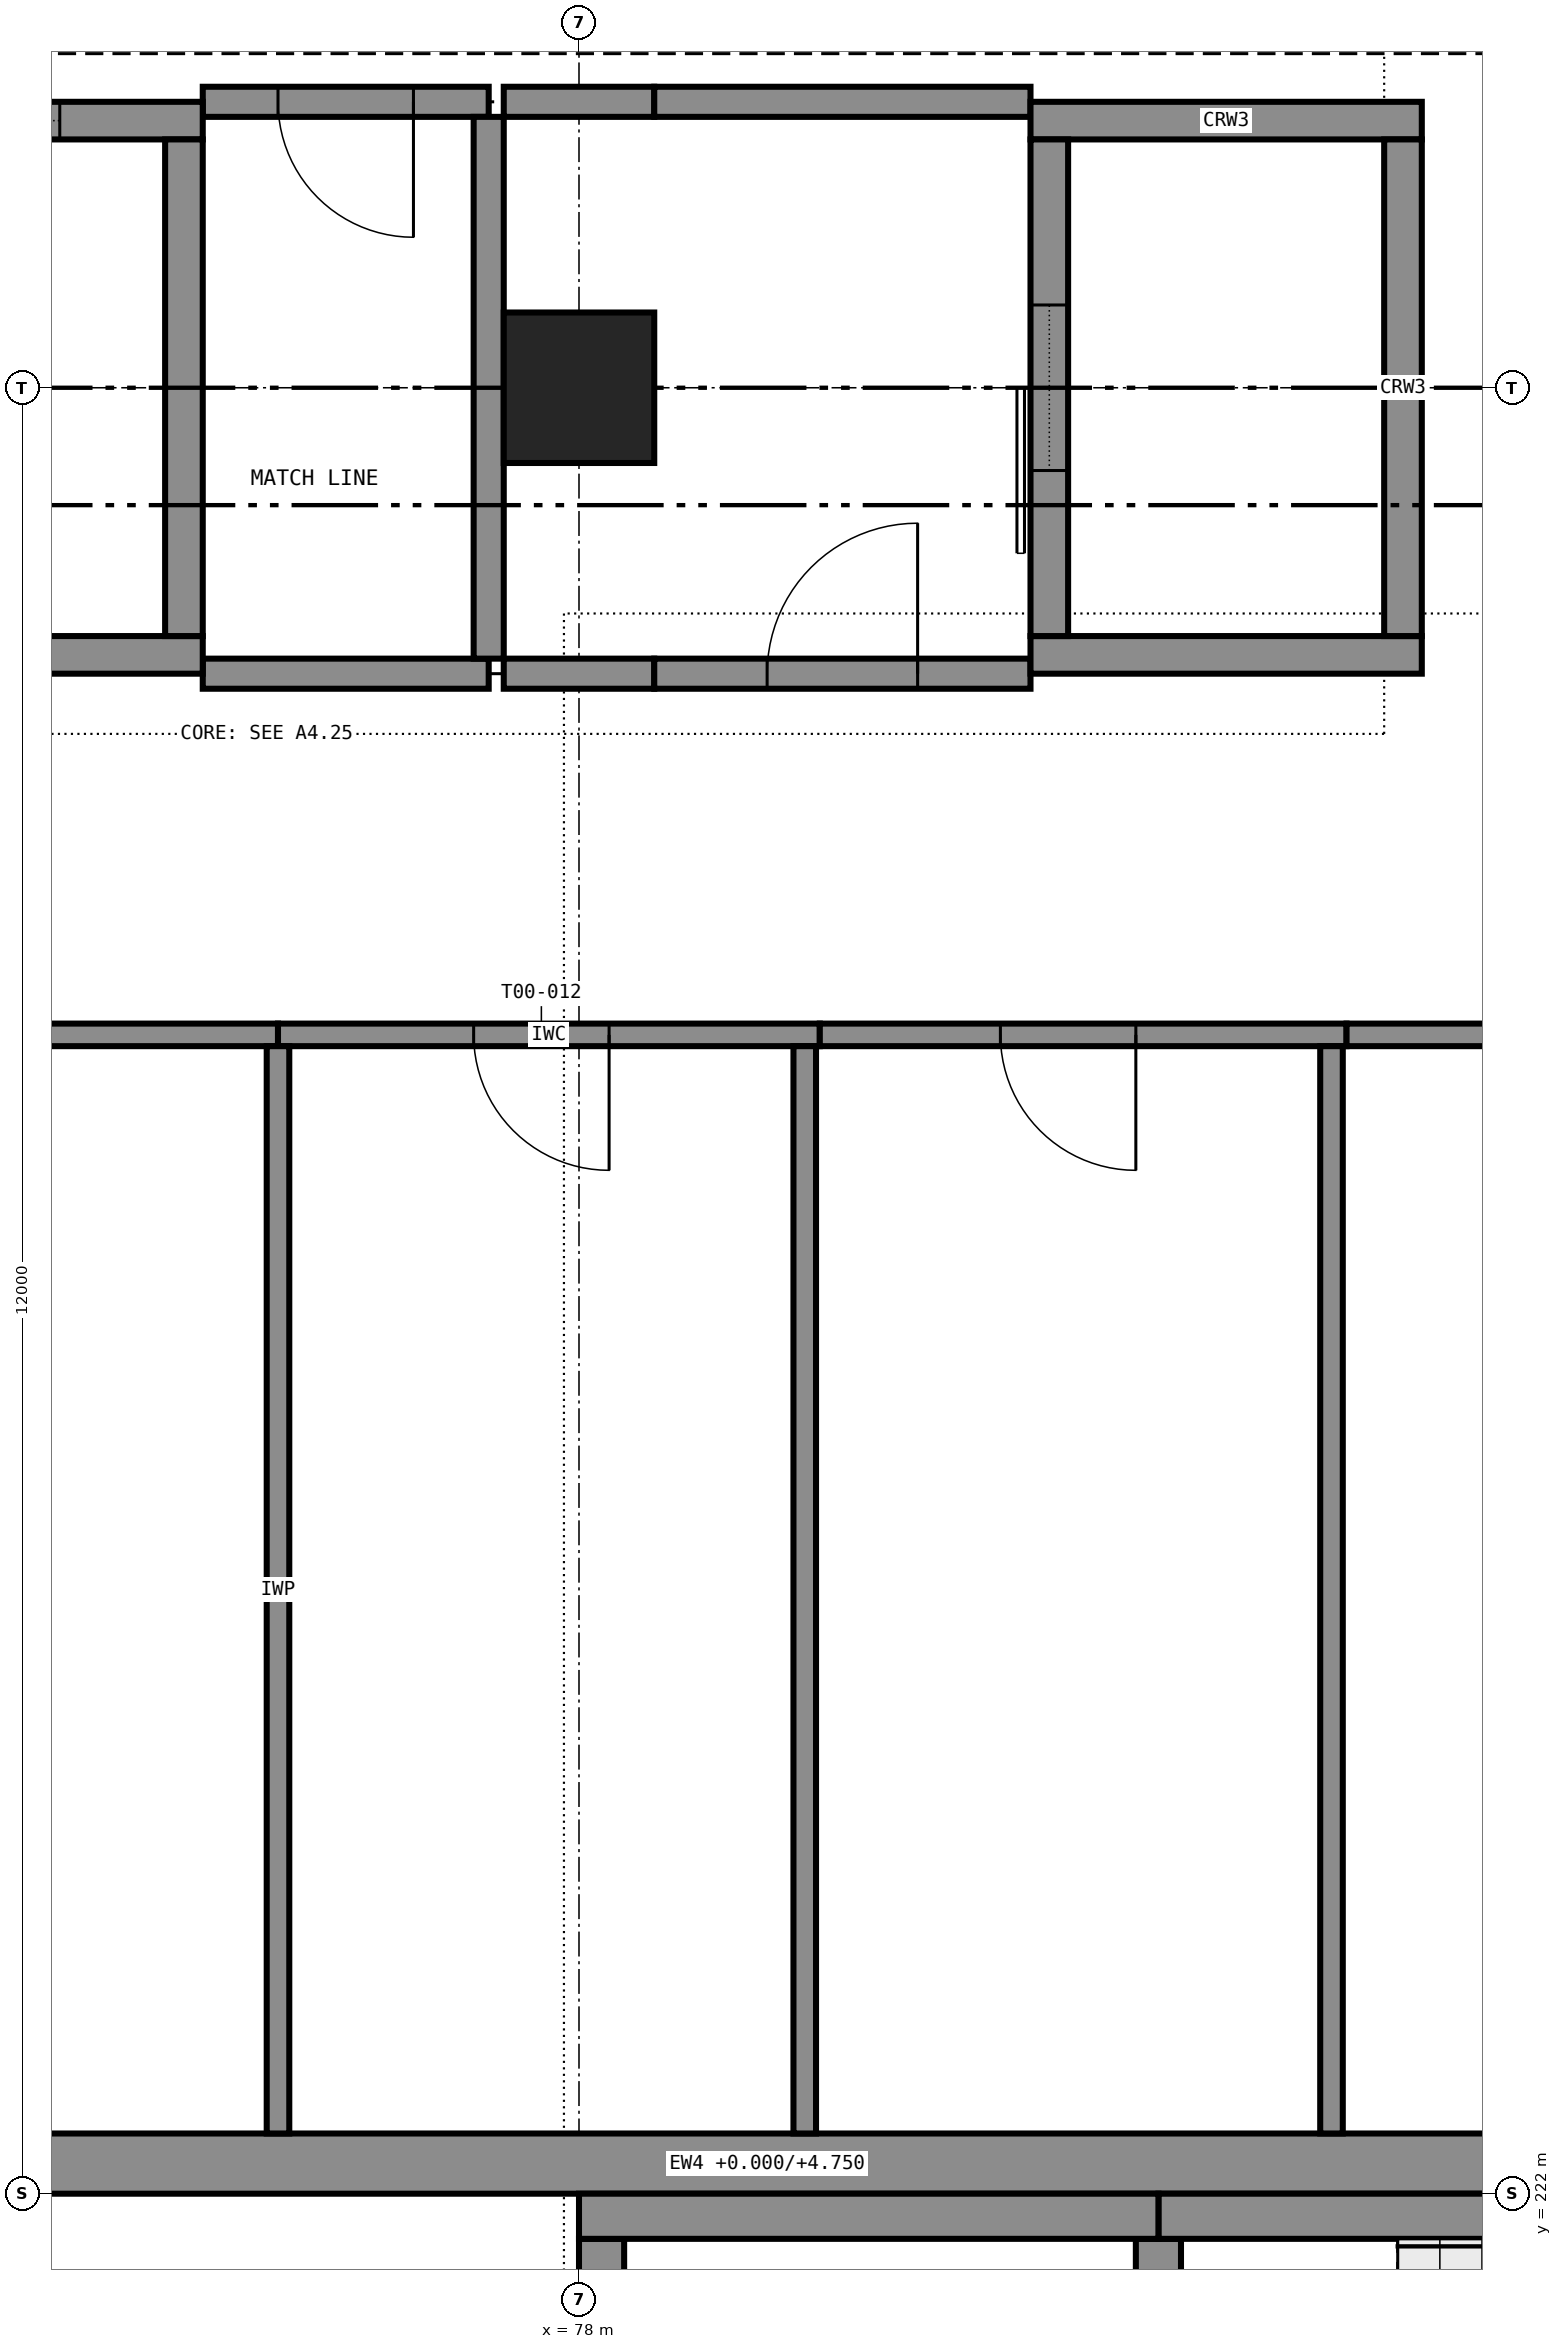
"""IFC4 building model, lengths in metres.
Left out: names, types, materials, properties, quantities, classifications, styles, units other than length and angle.
Written with IfcOpenShell. Run it as: python <this file> out.ifc"""

import sys

from ifc_helpers import new_model, si_unit, direction, frame, frame_2d, origin, origin_2d, place, context, subcontext, project, spatial, rectangle, extrude, element, fill, save


model = new_model("IFC4")
c1 = context("Model", 3, precision=1e-05, world=origin(), true_north=direction((0.0, 1.0)))
c2 = subcontext(c1, "Body", "Model", "MODEL_VIEW")
j1 = project(units=[si_unit("LENGTHUNIT", "METRE"), si_unit("PLANEANGLEUNIT", "RADIAN")], contexts=[c1])
p1 = place(None, origin())
s1 = spatial("IfcSite", under=j1, at=p1, CompositionType="ELEMENT")
p2 = place(p1, origin())
s2 = spatial("IfcBuilding", under=s1, at=p2, CompositionType="ELEMENT")
p3 = place(p2, origin())
s3 = spatial("IfcBuildingStorey", under=s2, at=p3, CompositionType="ELEMENT", Elevation=0.0)
p4 = place(p3, frame((78.0, 234.0, 0.0), z_axis=(0.0, 0.0, 1.0), x_axis=(1.0, 0.0, 0.0)))
e1 = element("IfcColumn", 1, at=p4, inside=s3, PredefinedType="COLUMN", context=c2, shape_type="SweptSolid", body=[
    extrude(rectangle(XDim=1.0, YDim=1.0, at=origin_2d()), origin(), (0.0, 0.0, 1.0), 6.0),
])
p5 = place(p3, frame((90.0, 221.85, 0.0), z_axis=(0.0, 0.0, 1.0), x_axis=(-1.0, 0.0, 0.0)))
e2 = element("IfcWall", 2, at=p5, inside=s3, PredefinedType="SHEAR", context=c2, shape_type="SweptSolid", body=[
    extrude(rectangle(XDim=8.15, YDim=0.3, at=frame_2d((4.075, 0.0))), origin(), (0.0, 0.0, 1.0), 5.75),
])
p6 = place(p3, frame((81.85, 221.85, 0.0), z_axis=(0.0, 0.0, 1.0), x_axis=(-1.0, 0.0, 0.0)))
e3 = element("IfcWall", 3, at=p6, inside=s3, PredefinedType="SHEAR", context=c2, shape_type="SweptSolid", body=[
    extrude(rectangle(XDim=3.85, YDim=0.3, at=frame_2d((1.925, 0.0))), origin(), (0.0, 0.0, 1.0), 5.75),
])
p7 = place(p3, frame((78.15, 218.55, 0.0), z_axis=(0.0, 0.0, 1.0), x_axis=(0.0, 1.0, 0.0)))
e4 = element("IfcWall", 4, at=p7, inside=s3, PredefinedType="SHEAR", context=c2, shape_type="SweptSolid", body=[
    extrude(rectangle(XDim=3.15, YDim=0.3, at=frame_2d((1.575, 0.0))), origin(), (0.0, 0.0, 1.0), 5.75),
])
p8 = place(p7, frame((1.15, 0.0, 0.0)))
e5 = element("IfcOpeningElement", 5, at=p8, cuts=e4, PredefinedType="OPENING", context=c2, shape_type="SweptSolid", body=[
    extrude(rectangle(XDim=1.0, YDim=2.1, at=frame_2d((0.5, 1.05))), frame((0.0, 0.16, 0.0), z_axis=(0.0, -1.0, 0.0), x_axis=(1.0, 0.0, 0.0)), (0.0, 0.0, 1.0), 0.32),
])
p9 = place(p3, frame((81.85, 218.7, 0.0), z_axis=(0.0, 0.0, 1.0), x_axis=(0.0, 1.0, 0.0)))
e6 = element("IfcWall", 6, at=p9, inside=s3, PredefinedType="SHEAR", context=c2, shape_type="SweptSolid", body=[
    extrude(rectangle(XDim=3.0, YDim=0.3, at=frame_2d((1.5, 0.0))), origin(), (0.0, 0.0, 1.0), 5.75),
])
p10 = place(p3, frame((72.5, 232.225, 0.0), z_axis=(0.0, 0.0, 1.0), x_axis=(1.0, 0.0, 0.0)))
e7 = element("IfcWall", 7, at=p10, inside=s3, PredefinedType="SHEAR", context=c2, shape_type="SweptSolid", body=[
    extrude(rectangle(XDim=3.0, YDim=0.25, at=frame_2d((1.5, 0.0))), origin(), (0.0, 0.0, 1.0), 6.0),
])
p11 = place(p3, frame((72.5, 235.775, 0.0), z_axis=(0.0, 0.0, 1.0), x_axis=(1.0, 0.0, 0.0)))
e8 = element("IfcWall", 8, at=p11, inside=s3, PredefinedType="SHEAR", context=c2, shape_type="SweptSolid", body=[
    extrude(rectangle(XDim=3.0, YDim=0.25, at=frame_2d((1.5, 0.0))), origin(), (0.0, 0.0, 1.0), 6.0),
])
p12 = place(p11, frame((0.95, 0.0, 0.0)))
e9 = element("IfcOpeningElement", 9, at=p12, cuts=e8, PredefinedType="OPENING", context=c2, shape_type="SweptSolid", body=[
    extrude(rectangle(XDim=1.1, YDim=2.1, at=frame_2d((0.55, 1.05))), frame((0.0, 0.135, 0.0), z_axis=(0.0, -1.0, 0.0), x_axis=(1.0, 0.0, 0.0)), (0.0, 0.0, 1.0), 0.27),
])
p13 = place(p3, frame((75.375, 232.35, 0.0), z_axis=(0.0, 0.0, 1.0), x_axis=(0.0, 1.0, 0.0)))
e10 = element("IfcWall", 10, at=p13, inside=s3, PredefinedType="SHEAR", context=c2, shape_type="SweptSolid", body=[
    extrude(rectangle(XDim=3.3, YDim=0.25, at=frame_2d((1.65, 0.0))), origin(), (0.0, 0.0, 1.0), 6.0),
])
for number, where, z_axis, x_axis in (
    (11, (81.0, 232.225, 0.0), (0.0, 0.0, 1.0), (1.0, 0.0, 0.0)),
    (12, (81.0, 235.775, 0.0), (0.0, 0.0, 1.0), (1.0, 0.0, 0.0)),
):
    element("IfcWall", number, at=place(p3, frame(where, z_axis=z_axis, x_axis=x_axis)), inside=s3, PredefinedType="SHEAR", context=c2, shape_type="SweptSolid", body=[
        extrude(rectangle(XDim=2.6, YDim=0.25, at=frame_2d((1.3, 0.0))), origin(), (0.0, 0.0, 1.0), 6.0),
    ])
p14 = place(p3, frame((81.125, 232.35, 0.0), z_axis=(0.0, 0.0, 1.0), x_axis=(0.0, 1.0, 0.0)))
e13 = element("IfcWall", 13, at=p14, inside=s3, PredefinedType="SHEAR", context=c2, shape_type="SweptSolid", body=[
    extrude(rectangle(XDim=3.3, YDim=0.25, at=frame_2d((1.65, 0.0))), origin(), (0.0, 0.0, 1.0), 6.0),
])
p15 = place(p14, frame((1.1, 0.0, 0.0)))
e14 = element("IfcOpeningElement", 14, at=p15, cuts=e13, PredefinedType="OPENING", context=c2, shape_type="SweptSolid", body=[
    extrude(rectangle(XDim=1.1, YDim=2.1, at=frame_2d((0.55, 1.05))), frame((0.0, 0.135, 0.0), z_axis=(0.0, -1.0, 0.0), x_axis=(1.0, 0.0, 0.0)), (0.0, 0.0, 1.0), 0.27),
])
p16 = place(p3, frame((83.475, 232.35, 0.0), z_axis=(0.0, 0.0, 1.0), x_axis=(0.0, 1.0, 0.0)))
e15 = element("IfcWall", 15, at=p16, inside=s3, PredefinedType="SHEAR", context=c2, shape_type="SweptSolid", body=[
    extrude(rectangle(XDim=3.3, YDim=0.25, at=frame_2d((1.65, 0.0))), origin(), (0.0, 0.0, 1.0), 6.0),
])
p17 = place(p3, frame((66.5, 222.2, 0.0), z_axis=(0.0, 0.0, 1.0), x_axis=(1.0, 0.0, 0.0)))
e16 = element("IfcWall", 16, at=p17, inside=s3, PredefinedType="SOLIDWALL", context=c2, shape_type="SweptSolid", body=[
    extrude(rectangle(XDim=23.5, YDim=0.4, at=frame_2d((11.75, 0.0))), origin(), (0.0, 0.0, 1.0), 4.75),
])
p18 = place(p17, frame((4.6, 0.0, 0.0)))
e17 = element("IfcOpeningElement", 17, at=p18, cuts=e16, PredefinedType="OPENING", context=c2, shape_type="SweptSolid", body=[
    extrude(rectangle(XDim=1.8, YDim=2.1, at=frame_2d((0.9, 1.05))), frame((0.0, 0.21, 0.0), z_axis=(0.0, -1.0, 0.0), x_axis=(1.0, 0.0, 0.0)), (0.0, 0.0, 1.0), 0.42),
])
p19 = place(p3, frame((75.5, 232.1, 0.0), z_axis=(0.0, 0.0, 1.0), x_axis=(1.0, 0.0, 0.0)))
e18 = element("IfcWall", 18, at=p19, inside=s3, PredefinedType="PARTITIONING", context=c2, shape_type="SweptSolid", body=[
    extrude(rectangle(XDim=1.9, YDim=0.2, at=frame_2d((0.95, 0.0))), origin(), (0.0, 0.0, 1.0), 5.75),
])
p20 = place(p3, frame((77.5, 232.1, 0.0), z_axis=(0.0, 0.0, 1.0), x_axis=(1.0, 0.0, 0.0)))
e19 = element("IfcWall", 19, at=p20, inside=s3, PredefinedType="PARTITIONING", context=c2, shape_type="SweptSolid", body=[
    extrude(rectangle(XDim=1.0, YDim=0.2, at=frame_2d((0.5, 0.0))), origin(), (0.0, 0.0, 1.0), 5.75),
])
p21 = place(p3, frame((78.5, 232.1, 0.0), z_axis=(0.0, 0.0, 1.0), x_axis=(1.0, 0.0, 0.0)))
e20 = element("IfcWall", 20, at=p21, inside=s3, PredefinedType="PARTITIONING", context=c2, shape_type="SweptSolid", body=[
    extrude(rectangle(XDim=2.5, YDim=0.2, at=frame_2d((1.25, 0.0))), origin(), (0.0, 0.0, 1.0), 5.75),
])
p22 = place(p21, frame((0.75, 0.0, 0.0)))
e21 = element("IfcOpeningElement", 21, at=p22, cuts=e20, PredefinedType="OPENING", context=c2, shape_type="SweptSolid", body=[
    extrude(rectangle(XDim=1.0, YDim=2.1, at=frame_2d((0.5, 1.05))), frame((0.0, 0.11, 0.0), z_axis=(0.0, -1.0, 0.0), x_axis=(1.0, 0.0, 0.0)), (0.0, 0.0, 1.0), 0.22),
])
p23 = place(p3, frame((77.4, 235.9, 0.0), z_axis=(0.0, 0.0, 1.0), x_axis=(-1.0, 0.0, 0.0)))
e22 = element("IfcWall", 22, at=p23, inside=s3, PredefinedType="PARTITIONING", context=c2, shape_type="SweptSolid", body=[
    extrude(rectangle(XDim=1.9, YDim=0.2, at=frame_2d((0.95, 0.0))), origin(), (0.0, 0.0, 1.0), 5.75),
])
p24 = place(p23, frame((0.5, 0.0, 0.0)))
e23 = element("IfcOpeningElement", 23, at=p24, cuts=e22, PredefinedType="OPENING", context=c2, shape_type="SweptSolid", body=[
    extrude(rectangle(XDim=0.9, YDim=2.1, at=frame_2d((0.45, 1.05))), frame((0.0, 0.11, 0.0), z_axis=(0.0, -1.0, 0.0), x_axis=(1.0, 0.0, 0.0)), (0.0, 0.0, 1.0), 0.22),
])
p25 = place(p3, frame((77.5, 235.9, 0.0), z_axis=(0.0, 0.0, 1.0), x_axis=(1.0, 0.0, 0.0)))
e24 = element("IfcWall", 24, at=p25, inside=s3, PredefinedType="PARTITIONING", context=c2, shape_type="SweptSolid", body=[
    extrude(rectangle(XDim=1.0, YDim=0.2, at=frame_2d((0.5, 0.0))), origin(), (0.0, 0.0, 1.0), 5.75),
])
p26 = place(p3, frame((78.5, 235.9, 0.0), z_axis=(0.0, 0.0, 1.0), x_axis=(1.0, 0.0, 0.0)))
e25 = element("IfcWall", 25, at=p26, inside=s3, PredefinedType="PARTITIONING", context=c2, shape_type="SweptSolid", body=[
    extrude(rectangle(XDim=2.5, YDim=0.2, at=frame_2d((1.25, 0.0))), origin(), (0.0, 0.0, 1.0), 5.75),
])
p27 = place(p3, frame((77.4, 232.2, 0.0), z_axis=(0.0, 0.0, 1.0), x_axis=(0.0, 1.0, 0.0)))
e26 = element("IfcWall", 26, at=p27, inside=s3, PredefinedType="PARTITIONING", context=c2, shape_type="SweptSolid", body=[
    extrude(rectangle(XDim=3.6, YDim=0.2, at=frame_2d((1.8, 0.0))), origin(), (0.0, 0.0, 1.0), 5.75),
])
p28 = place(p3, frame((76.0, 229.7, 0.0), z_axis=(0.0, 0.0, 1.0), x_axis=(-1.0, 0.0, 0.0)))
e27 = element("IfcWall", 27, at=p28, inside=s3, PredefinedType="PARTITIONING", context=c2, shape_type="SweptSolid", body=[
    extrude(rectangle(XDim=9.9, YDim=0.15, at=frame_2d((4.95, 0.0))), origin(), (0.0, 0.0, 1.0), 5.75),
])
p29 = place(p28, frame((4.4, 0.0, 0.0)))
e28 = element("IfcOpeningElement", 28, at=p29, cuts=e27, PredefinedType="OPENING", context=c2, shape_type="SweptSolid", body=[
    extrude(rectangle(XDim=1.2, YDim=2.1, at=frame_2d((0.6, 1.05))), frame((0.0, 0.085, 0.0), z_axis=(0.0, -1.0, 0.0), x_axis=(1.0, 0.0, 0.0)), (0.0, 0.0, 1.0), 0.17),
])
p30 = place(p3, frame((79.6, 229.7, 0.0), z_axis=(0.0, 0.0, 1.0), x_axis=(-1.0, 0.0, 0.0)))
e29 = element("IfcWall", 29, at=p30, inside=s3, PredefinedType="PARTITIONING", context=c2, shape_type="SweptSolid", body=[
    extrude(rectangle(XDim=3.6, YDim=0.15, at=frame_2d((1.8, 0.0))), origin(), (0.0, 0.0, 1.0), 5.75),
])
p31 = place(p30, frame((1.4, 0.0, 0.0)))
e30 = element("IfcOpeningElement", 30, at=p31, cuts=e29, PredefinedType="OPENING", context=c2, shape_type="SweptSolid", body=[
    extrude(rectangle(XDim=0.9, YDim=2.1, at=frame_2d((0.45, 1.05))), frame((0.0, 0.085, 0.0), z_axis=(0.0, -1.0, 0.0), x_axis=(1.0, 0.0, 0.0)), (0.0, 0.0, 1.0), 0.17),
])
p32 = place(p3, frame((76.0, 222.4, 0.0), z_axis=(0.0, 0.0, 1.0), x_axis=(0.0, 1.0, 0.0)))
e31 = element("IfcWall", 31, at=p32, inside=s3, PredefinedType="PARTITIONING", context=c2, shape_type="SweptSolid", body=[
    extrude(rectangle(XDim=7.225, YDim=0.15, at=frame_2d((3.613, 0.0))), origin(), (0.0, 0.0, 1.0), 5.75),
])
p33 = place(p3, frame((83.1, 229.7, 0.0), z_axis=(0.0, 0.0, 1.0), x_axis=(-1.0, 0.0, 0.0)))
e32 = element("IfcWall", 32, at=p33, inside=s3, PredefinedType="PARTITIONING", context=c2, shape_type="SweptSolid", body=[
    extrude(rectangle(XDim=3.5, YDim=0.15, at=frame_2d((1.75, 0.0))), origin(), (0.0, 0.0, 1.0), 5.75),
])
p34 = place(p33, frame((1.4, 0.0, 0.0)))
e33 = element("IfcOpeningElement", 33, at=p34, cuts=e32, PredefinedType="OPENING", context=c2, shape_type="SweptSolid", body=[
    extrude(rectangle(XDim=0.9, YDim=2.1, at=frame_2d((0.45, 1.05))), frame((0.0, 0.085, 0.0), z_axis=(0.0, -1.0, 0.0), x_axis=(1.0, 0.0, 0.0)), (0.0, 0.0, 1.0), 0.17),
])
p35 = place(p3, frame((79.5, 222.4, 0.0), z_axis=(0.0, 0.0, 1.0), x_axis=(0.0, 1.0, 0.0)))
e34 = element("IfcWall", 34, at=p35, inside=s3, PredefinedType="PARTITIONING", context=c2, shape_type="SweptSolid", body=[
    extrude(rectangle(XDim=7.225, YDim=0.15, at=frame_2d((3.613, 0.0))), origin(), (0.0, 0.0, 1.0), 5.75),
])
p36 = place(p3, frame((86.0, 229.7, 0.0), z_axis=(0.0, 0.0, 1.0), x_axis=(-1.0, 0.0, 0.0)))
e35 = element("IfcWall", 35, at=p36, inside=s3, PredefinedType="PARTITIONING", context=c2, shape_type="SweptSolid", body=[
    extrude(rectangle(XDim=2.9, YDim=0.15, at=frame_2d((1.45, 0.0))), origin(), (0.0, 0.0, 1.0), 5.75),
])
p37 = place(p36, frame((1.05, 0.0, 0.0)))
e36 = element("IfcOpeningElement", 36, at=p37, cuts=e35, PredefinedType="OPENING", context=c2, shape_type="SweptSolid", body=[
    extrude(rectangle(XDim=0.9, YDim=2.1, at=frame_2d((0.45, 1.05))), frame((0.0, 0.085, 0.0), z_axis=(0.0, -1.0, 0.0), x_axis=(1.0, 0.0, 0.0)), (0.0, 0.0, 1.0), 0.17),
])
p38 = place(p3, frame((83.0, 222.4, 0.0), z_axis=(0.0, 0.0, 1.0), x_axis=(0.0, 1.0, 0.0)))
e37 = element("IfcWall", 37, at=p38, inside=s3, PredefinedType="PARTITIONING", context=c2, shape_type="SweptSolid", body=[
    extrude(rectangle(XDim=7.225, YDim=0.15, at=frame_2d((3.613, 0.0))), origin(), (0.0, 0.0, 1.0), 5.75),
])
p39 = place(p24, origin())
e38 = element("IfcDoor", 38, at=p39, inside=s3, OperationType="SINGLE_SWING_LEFT", PredefinedType="DOOR", context=c2, shape_type="SweptSolid", body=[
    extrude(rectangle(XDim=0.9, YDim=2.1, at=frame_2d((0.45, 1.05))), frame((0.0, 0.025, 0.0), z_axis=(0.0, -1.0, 0.0), x_axis=(1.0, 0.0, 0.0)), (0.0, 0.0, 1.0), 0.05),
])
fill(e23, e38)
p40 = place(p22, origin())
e39 = element("IfcDoor", 39, at=p40, inside=s3, OperationType="SINGLE_SWING_RIGHT", PredefinedType="DOOR", context=c2, shape_type="SweptSolid", body=[
    extrude(rectangle(XDim=1.0, YDim=2.1, at=frame_2d((0.5, 1.05))), frame((0.0, 0.025, 0.0), z_axis=(0.0, -1.0, 0.0), x_axis=(1.0, 0.0, 0.0)), (0.0, 0.0, 1.0), 0.05),
])
fill(e21, e39)
p41 = place(p31, origin())
e40 = element("IfcDoor", 40, at=p41, inside=s3, OperationType="SINGLE_SWING_LEFT", PredefinedType="DOOR", context=c2, shape_type="SweptSolid", body=[
    extrude(rectangle(XDim=0.9, YDim=2.1, at=frame_2d((0.45, 1.05))), frame((0.0, 0.025, 0.0), z_axis=(0.0, -1.0, 0.0), x_axis=(1.0, 0.0, 0.0)), (0.0, 0.0, 1.0), 0.05),
])
fill(e30, e40)
p42 = place(p34, origin())
e41 = element("IfcDoor", 41, at=p42, inside=s3, OperationType="SINGLE_SWING_LEFT", PredefinedType="DOOR", context=c2, shape_type="SweptSolid", body=[
    extrude(rectangle(XDim=0.9, YDim=2.1, at=frame_2d((0.45, 1.05))), frame((0.0, 0.025, 0.0), z_axis=(0.0, -1.0, 0.0), x_axis=(1.0, 0.0, 0.0)), (0.0, 0.0, 1.0), 0.05),
])
fill(e33, e41)
p43 = place(p12, origin())
e42 = element("IfcDoor", 42, at=p43, inside=s3, OperationType="SLIDING_TO_LEFT", PredefinedType="DOOR", context=c2, shape_type="SweptSolid", body=[
    extrude(rectangle(XDim=1.1, YDim=2.1, at=frame_2d((0.55, 1.05))), frame((0.0, 0.025, 0.0), z_axis=(0.0, -1.0, 0.0), x_axis=(1.0, 0.0, 0.0)), (0.0, 0.0, 1.0), 0.05),
])
fill(e9, e42)
p44 = place(p15, origin())
e43 = element("IfcDoor", 43, at=p44, inside=s3, OperationType="SLIDING_TO_LEFT", PredefinedType="DOOR", context=c2, shape_type="SweptSolid", body=[
    extrude(rectangle(XDim=1.1, YDim=2.1, at=frame_2d((0.55, 1.05))), frame((0.0, 0.025, 0.0), z_axis=(0.0, -1.0, 0.0), x_axis=(1.0, 0.0, 0.0)), (0.0, 0.0, 1.0), 0.05),
])
fill(e14, e43)
save(model, sys.argv[1])
